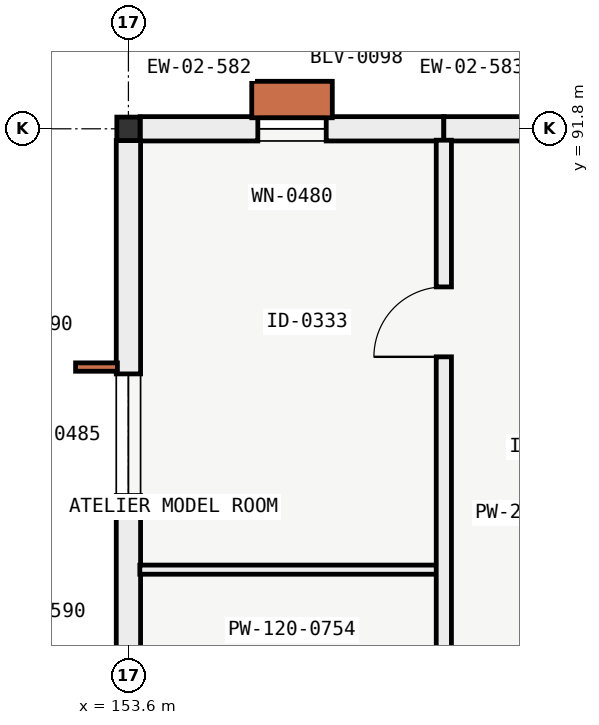
"""IFC4 building model, lengths in metres.
Left out: names, types, materials, properties, quantities, classifications, styles, units other than length and angle.
Written with IfcOpenShell. Run it as: python <this file> out.ifc"""

import sys

from ifc_helpers import new_model, si_unit, direction, frame, frame_2d, origin, origin_2d, place, context, subcontext, project, spatial, rectangle, i_section, extrude, element, fill, save


model = new_model("IFC4")
c1 = context("Model", 3, precision=1e-05, world=origin(), true_north=direction((0.0, 1.0)))
c2 = subcontext(c1, "Body", "Model", "MODEL_VIEW")
j1 = project(units=[si_unit("LENGTHUNIT", "METRE"), si_unit("PLANEANGLEUNIT", "RADIAN")], contexts=[c1])
p1 = place(None, origin())
s1 = spatial("IfcSite", under=j1, at=p1, CompositionType="ELEMENT")
p2 = place(p1, origin())
s2 = spatial("IfcBuilding", under=s1, at=p2, CompositionType="ELEMENT")
p3 = place(p2, frame((0.0, 0.0, 9.6)))
s3 = spatial("IfcBuildingStorey", under=s2, at=p3, CompositionType="ELEMENT", Elevation=9.6)
p4 = place(p3, frame((153.6, 91.8, 0.0), z_axis=(0.0, 0.0, 1.0), x_axis=(1.0, 0.0, 0.0)))
e1 = element("IfcColumn", 1, at=p4, inside=s3, PredefinedType="COLUMN", context=c2, shape_type="SweptSolid", body=[
    extrude(i_section(OverallWidth=0.305, OverallDepth=0.308, WebThickness=0.01, FlangeThickness=0.015, FilletRadius=0.017, at=origin_2d()), origin(), (0.0, 0.0, 1.0), 4.02),
])
p5 = place(p3, frame((153.755, 91.8, 0.0), z_axis=(0.0, 0.0, 1.0), x_axis=(1.0, 0.0, 0.0)))
e2 = element("IfcWall", 2, at=p5, inside=s3, PredefinedType="SOLIDWALL", context=c2, shape_type="SweptSolid", body=[
    extrude(rectangle(XDim=3.995, YDim=0.32, at=frame_2d((1.998, 0.0))), origin(), (0.0, 0.0, 1.0), 3.821),
])
p6 = place(p5, frame((1.548, 0.0, 0.85)))
e3 = element("IfcOpeningElement", 3, at=p6, cuts=e2, PredefinedType="OPENING", context=c2, shape_type="SweptSolid", body=[
    extrude(rectangle(XDim=0.9, YDim=2.2, at=frame_2d((0.45, 1.1))), frame((0.0, 0.17, 0.0), z_axis=(0.0, -1.0, 0.0), x_axis=(1.0, 0.0, 0.0)), (0.0, 0.0, 1.0), 0.34),
])
p7 = place(p3, frame((157.75, 91.8, 0.0), z_axis=(0.0, 0.0, 1.0), x_axis=(1.0, 0.0, 0.0)))
e4 = element("IfcWall", 4, at=p7, inside=s3, PredefinedType="SOLIDWALL", context=c2, shape_type="SweptSolid", body=[
    extrude(rectangle(XDim=3.2, YDim=0.32, at=frame_2d((1.6, 0.0))), origin(), (0.0, 0.0, 1.0), 3.821),
])
p8 = place(p7, frame((1.15, 0.0, 0.85)))
e5 = element("IfcOpeningElement", 5, at=p8, cuts=e4, PredefinedType="OPENING", context=c2, shape_type="SweptSolid", body=[
    extrude(rectangle(XDim=0.9, YDim=2.2, at=frame_2d((0.45, 1.1))), frame((0.0, 0.17, 0.0), z_axis=(0.0, -1.0, 0.0), x_axis=(1.0, 0.0, 0.0)), (0.0, 0.0, 1.0), 0.34),
])
p9 = place(p3, frame((153.6, 83.906, 0.0), z_axis=(0.0, 0.0, 1.0), x_axis=(0.0, 1.0, 0.0)))
e6 = element("IfcWall", 6, at=p9, inside=s3, PredefinedType="SOLIDWALL", context=c2, shape_type="SweptSolid", body=[
    extrude(rectangle(XDim=7.739, YDim=0.32, at=frame_2d((3.87, 0.0))), origin(), (0.0, 0.0, 1.0), 3.821),
])
p10 = place(p9, frame((3.07, 0.0, 0.9)))
e7 = element("IfcOpeningElement", 7, at=p10, cuts=e6, PredefinedType="OPENING", context=c2, shape_type="SweptSolid", body=[
    extrude(rectangle(XDim=1.6, YDim=1.9, at=frame_2d((0.8, 0.95))), frame((0.0, 0.17, 0.0), z_axis=(0.0, -1.0, 0.0), x_axis=(1.0, 0.0, 0.0)), (0.0, 0.0, 1.0), 0.34),
])
p11 = place(p3, frame((153.75, 86.0, 0.0), z_axis=(0.0, 0.0, 1.0), x_axis=(1.0, 0.0, 0.0)))
e8 = element("IfcWall", 8, at=p11, inside=s3, PredefinedType="PARTITIONING", context=c2, shape_type="SweptSolid", body=[
    extrude(rectangle(XDim=4.0, YDim=0.12, at=frame_2d((2.0, 0.0))), origin(), (0.0, 0.0, 1.0), 3.85),
])
p12 = place(p3, frame((157.75, 81.6, 0.0), z_axis=(0.0, 0.0, 1.0), x_axis=(0.0, 1.0, 0.0)))
e9 = element("IfcWall", 9, at=p12, inside=s3, PredefinedType="PARTITIONING", context=c2, shape_type="SweptSolid", body=[
    extrude(rectangle(XDim=10.05, YDim=0.2, at=frame_2d((5.025, 0.0))), origin(), (0.0, 0.0, 1.0), 3.821),
])
p13 = place(p12, frame((2.2, 0.0, 0.0)))
e10 = element("IfcOpeningElement", 10, at=p13, cuts=e9, PredefinedType="OPENING", context=c2, shape_type="SweptSolid", body=[
    extrude(rectangle(XDim=0.9, YDim=2.05, at=frame_2d((0.45, 1.025))), frame((0.0, 0.11, 0.0), z_axis=(0.0, -1.0, 0.0), x_axis=(1.0, 0.0, 0.0)), (0.0, 0.0, 1.0), 0.22),
])
p14 = place(p12, frame((7.2, 0.0, 0.0)))
e11 = element("IfcOpeningElement", 11, at=p14, cuts=e9, PredefinedType="OPENING", context=c2, shape_type="SweptSolid", body=[
    extrude(rectangle(XDim=0.92, YDim=2.1, at=frame_2d((0.46, 1.05))), frame((0.0, 0.11, 0.0), z_axis=(0.0, -1.0, 0.0), x_axis=(1.0, 0.0, 0.0)), (0.0, 0.0, 1.0), 0.22),
])
p15 = place(p6, origin())
e12 = element("IfcWindow", 12, at=p15, inside=s3, PartitioningType="SINGLE_PANEL", PredefinedType="WINDOW", context=c2, shape_type="SweptSolid", body=[
    extrude(rectangle(XDim=0.9, YDim=2.2, at=frame_2d((0.45, 1.1))), frame((0.0, 0.03, 0.0), z_axis=(0.0, -1.0, 0.0), x_axis=(1.0, 0.0, 0.0)), (0.0, 0.0, 1.0), 0.06),
])
fill(e3, e12)
p16 = place(p10, origin())
e13 = element("IfcWindow", 13, at=p16, inside=s3, PartitioningType="SINGLE_PANEL", PredefinedType="WINDOW", context=c2, shape_type="SweptSolid", body=[
    extrude(rectangle(XDim=1.6, YDim=1.9, at=frame_2d((0.8, 0.95))), frame((0.0, 0.03, 0.0), z_axis=(0.0, -1.0, 0.0), x_axis=(1.0, 0.0, 0.0)), (0.0, 0.0, 1.0), 0.06),
])
fill(e7, e13)
p17 = place(p14, origin())
e14 = element("IfcDoor", 14, at=p17, inside=s3, OperationType="SINGLE_SWING_LEFT", PredefinedType="DOOR", context=c2, shape_type="SweptSolid", body=[
    extrude(rectangle(XDim=0.92, YDim=2.1, at=frame_2d((0.46, 1.05))), frame((0.0, 0.025, 0.0), z_axis=(0.0, -1.0, 0.0), x_axis=(1.0, 0.0, 0.0)), (0.0, 0.0, 1.0), 0.05),
])
fill(e11, e14)
save(model, sys.argv[1])
